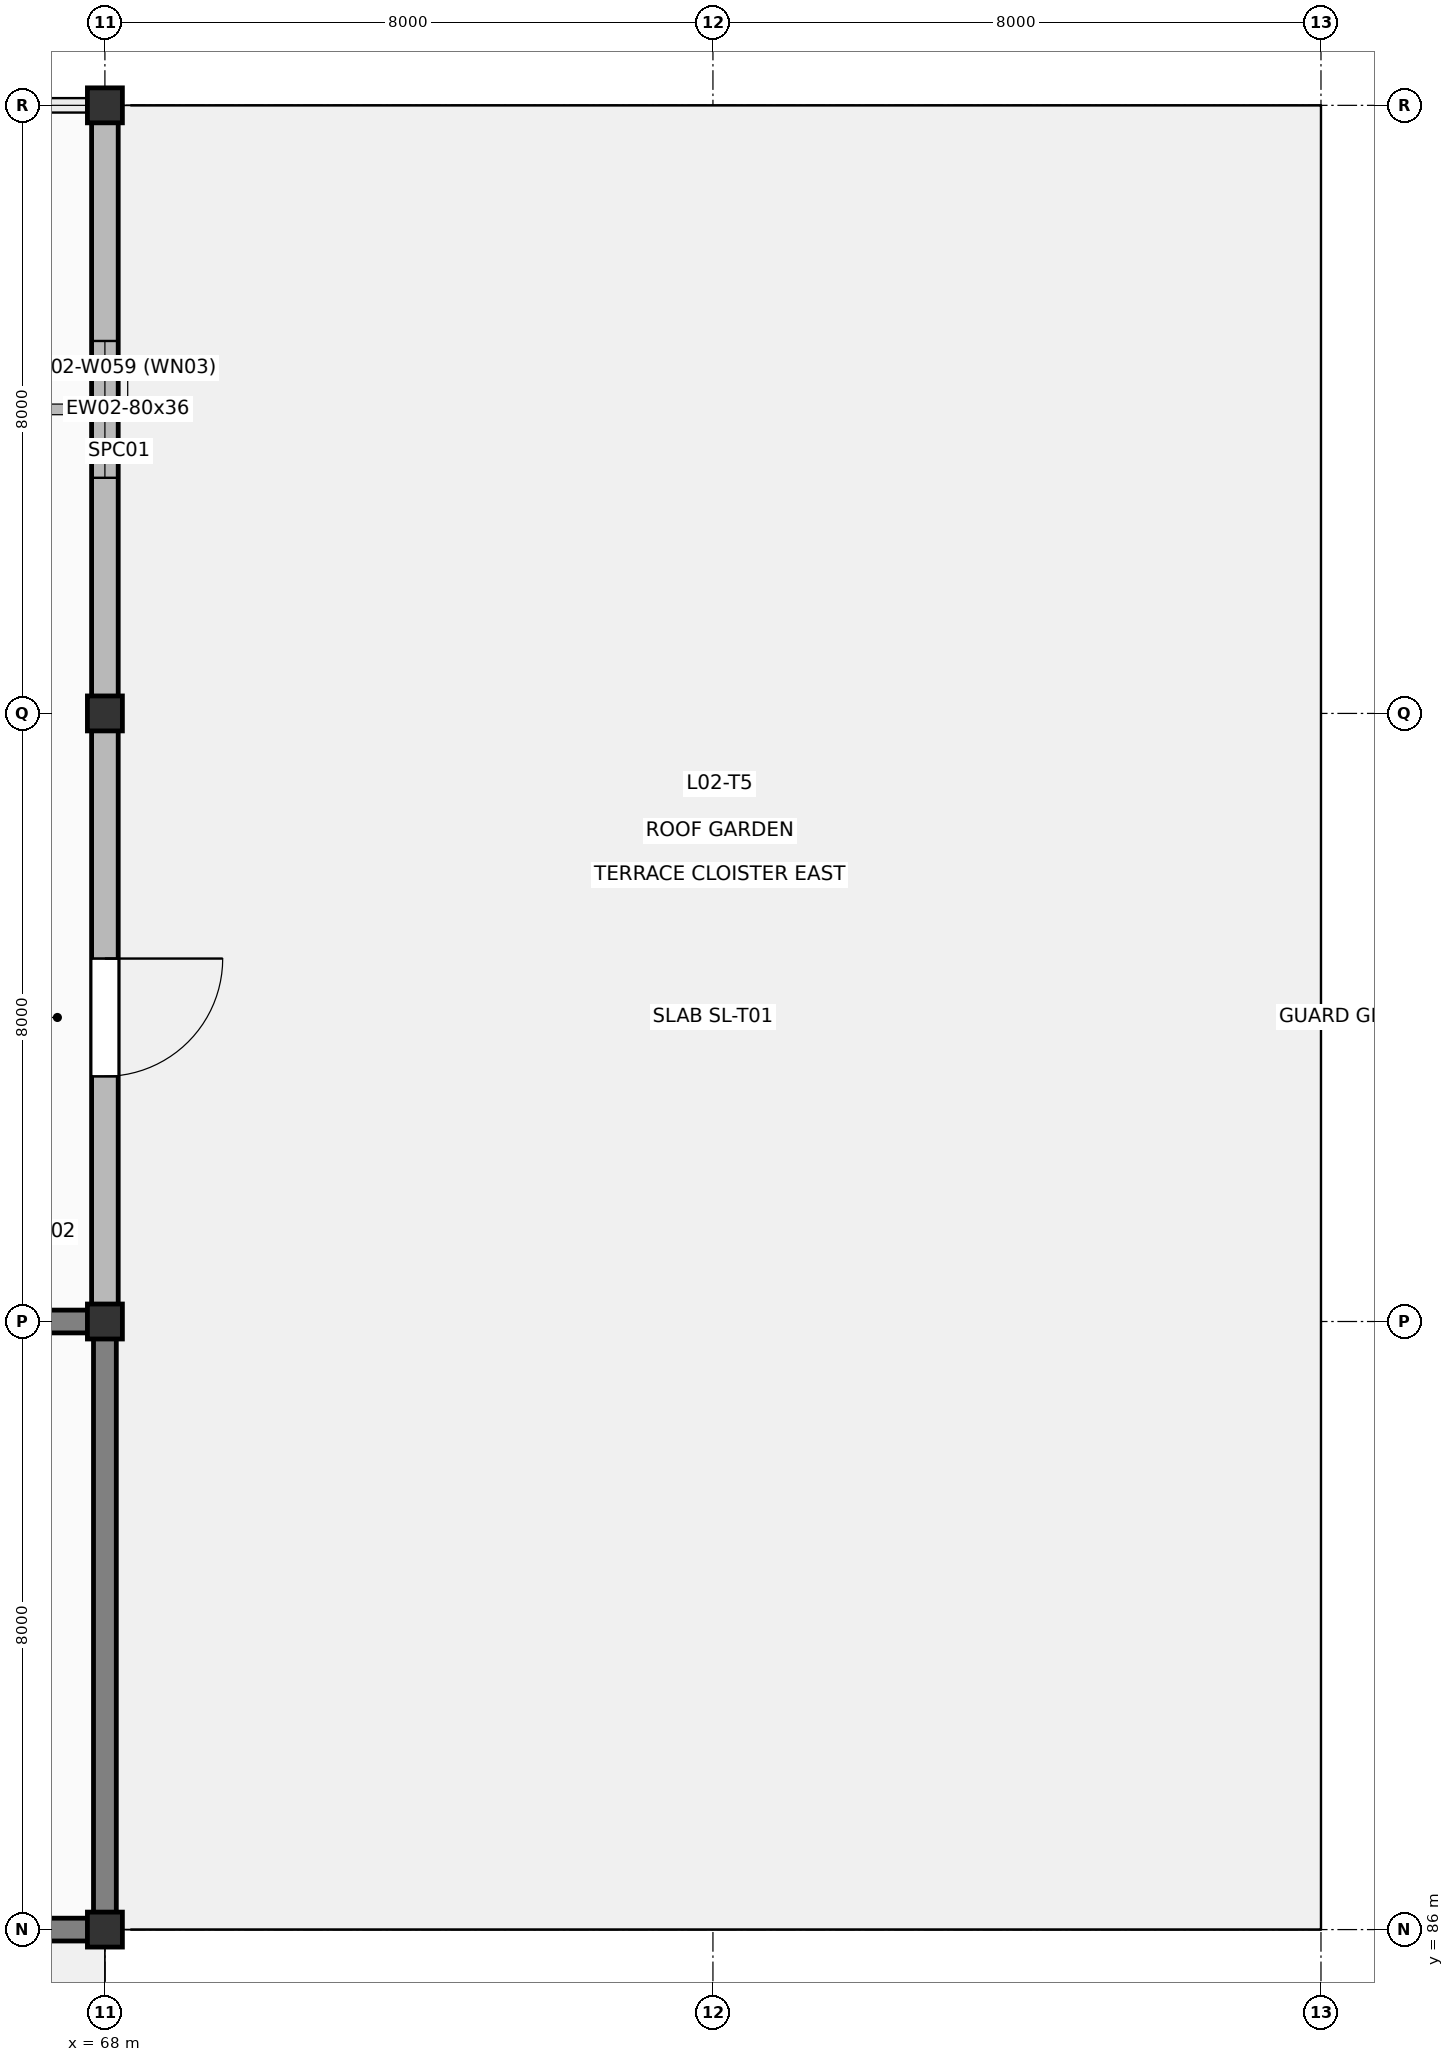
"""IFC4 building model, lengths in metres.
Left out: names, types, materials, properties, quantities, classifications, styles, units other than length and angle.
Written with IfcOpenShell. Run it as: python <this file> out.ifc"""

import sys

from ifc_helpers import new_model, si_unit, direction, frame, frame_2d, origin, origin_2d, place, context, subcontext, project, spatial, rectangle, extrude, element, fill, save


model = new_model("IFC4")
c1 = context("Model", 3, precision=1e-05, world=origin(), true_north=direction((0.0, 1.0)))
c2 = subcontext(c1, "Body", "Model", "MODEL_VIEW")
j1 = project(units=[si_unit("LENGTHUNIT", "METRE"), si_unit("PLANEANGLEUNIT", "RADIAN")], contexts=[c1])
p1 = place(None, origin())
s1 = spatial("IfcSite", under=j1, at=p1, CompositionType="ELEMENT")
p2 = place(p1, origin())
s2 = spatial("IfcBuilding", under=s1, at=p2, CompositionType="ELEMENT")
p3 = place(p2, frame((0.0, 0.0, 9.6)))
s3 = spatial("IfcBuildingStorey", under=s2, at=p3, CompositionType="ELEMENT", Elevation=9.6)
for number, where, z_axis, x_axis in (
    (1, (68.0, 86.0, 0.0), (0.0, 0.0, 1.0), (1.0, 0.0, 0.0)),
    (2, (68.0, 94.0, 0.0), (0.0, 0.0, 1.0), (1.0, 0.0, 0.0)),
    (3, (68.0, 102.0, 0.0), (0.0, 0.0, 1.0), (1.0, 0.0, 0.0)),
    (4, (68.0, 110.0, 0.0), (0.0, 0.0, 1.0), (1.0, 0.0, 0.0)),
):
    element("IfcColumn", number, at=place(p3, frame(where, z_axis=z_axis, x_axis=x_axis)), inside=s3, PredefinedType="COLUMN", context=c2, shape_type="SweptSolid", body=[
        extrude(rectangle(XDim=0.46, YDim=0.46, at=origin_2d()), origin(), (0.0, 0.0, 1.0), 4.2),
    ])
p4 = place(p3, frame((68.0, 110.0, 0.0), z_axis=(0.0, 0.0, 1.0), x_axis=(0.0, -1.0, 0.0)))
e5 = element("IfcWall", 5, at=p4, inside=s3, PredefinedType="SOLIDWALL", context=c2, shape_type="SweptSolid", body=[
    extrude(rectangle(XDim=8.0, YDim=0.35, at=frame_2d((4.0, 0.0))), origin(), (0.0, 0.0, 1.0), 3.58),
])
p5 = place(p4, frame((3.1, 0.0, 0.85)))
e6 = element("IfcOpeningElement", 6, at=p5, cuts=e5, PredefinedType="OPENING", context=c2, shape_type="SweptSolid", body=[
    extrude(rectangle(XDim=1.8, YDim=2.4, at=frame_2d((0.9, 1.2))), frame((0.0, 0.185, 0.0), z_axis=(0.0, -1.0, 0.0), x_axis=(1.0, 0.0, 0.0)), (0.0, 0.0, 1.0), 0.37),
])
p6 = place(p3, frame((68.0, 102.0, 0.0), z_axis=(0.0, 0.0, 1.0), x_axis=(0.0, -1.0, 0.0)))
e7 = element("IfcWall", 7, at=p6, inside=s3, PredefinedType="SOLIDWALL", context=c2, shape_type="SweptSolid", body=[
    extrude(rectangle(XDim=8.0, YDim=0.35, at=frame_2d((4.0, 0.0))), origin(), (0.0, 0.0, 1.0), 3.58),
])
p7 = place(p6, frame((3.225, 0.0, 0.0)))
e8 = element("IfcOpeningElement", 8, at=p7, cuts=e7, PredefinedType="OPENING", context=c2, shape_type="SweptSolid", body=[
    extrude(rectangle(XDim=1.55, YDim=2.2, at=frame_2d((0.775, 1.1))), frame((0.0, 0.185, 0.0), z_axis=(0.0, -1.0, 0.0), x_axis=(1.0, 0.0, 0.0)), (0.0, 0.0, 1.0), 0.37),
])
for number, where, z_axis, x_axis in (
    (9, (68.0, 94.0, 0.0), (0.0, 0.0, 1.0), (0.0, -1.0, 0.0)),
    (10, (68.0, 86.0, 0.0), (0.0, 0.0, 1.0), (-1.0, 0.0, 0.0)),
):
    element("IfcWall", number, at=place(p3, frame(where, z_axis=z_axis, x_axis=x_axis)), inside=s3, PredefinedType="SOLIDWALL", context=c2, shape_type="SweptSolid", body=[
        extrude(rectangle(XDim=8.0, YDim=0.3, at=frame_2d((4.0, 0.0))), origin(), (0.0, 0.0, 1.0), 4.2),
    ])
p8 = place(p3, frame((60.0, 94.0, 0.0), z_axis=(0.0, 0.0, 1.0), x_axis=(1.0, 0.0, 0.0)))
e11 = element("IfcWall", 11, at=p8, inside=s3, PredefinedType="SHEAR", context=c2, shape_type="SweptSolid", body=[
    extrude(rectangle(XDim=8.0, YDim=0.3, at=frame_2d((4.0, 0.0))), origin(), (0.0, 0.0, 1.0), 4.2),
])
p9 = place(p8, frame((1.65, 0.0, 0.0)))
e12 = element("IfcOpeningElement", 12, at=p9, cuts=e11, PredefinedType="OPENING", context=c2, shape_type="SweptSolid", body=[
    extrude(rectangle(XDim=1.1, YDim=2.2, at=frame_2d((0.55, 1.1))), frame((0.0, 0.16, 0.0), z_axis=(0.0, -1.0, 0.0), x_axis=(1.0, 0.0, 0.0)), (0.0, 0.0, 1.0), 0.32),
])
p10 = place(p5, origin())
e13 = element("IfcWindow", 13, at=p10, inside=s3, PartitioningType="DOUBLE_PANEL_VERTICAL", PredefinedType="WINDOW", context=c2, shape_type="SweptSolid", body=[
    extrude(rectangle(XDim=1.8, YDim=2.4, at=frame_2d((0.9, 1.2))), frame((0.0, 0.03, 0.0), z_axis=(0.0, -1.0, 0.0), x_axis=(1.0, 0.0, 0.0)), (0.0, 0.0, 1.0), 0.06),
])
fill(e6, e13)
p11 = place(p7, origin())
e14 = element("IfcDoor", 14, at=p11, inside=s3, OperationType="SINGLE_SWING_LEFT", PredefinedType="DOOR", context=c2, shape_type="SweptSolid", body=[
    extrude(rectangle(XDim=1.55, YDim=2.2, at=frame_2d((0.775, 1.1))), frame((0.0, 0.025, 0.0), z_axis=(0.0, -1.0, 0.0), x_axis=(1.0, 0.0, 0.0)), (0.0, 0.0, 1.0), 0.05),
])
fill(e8, e14)
save(model, sys.argv[1])
